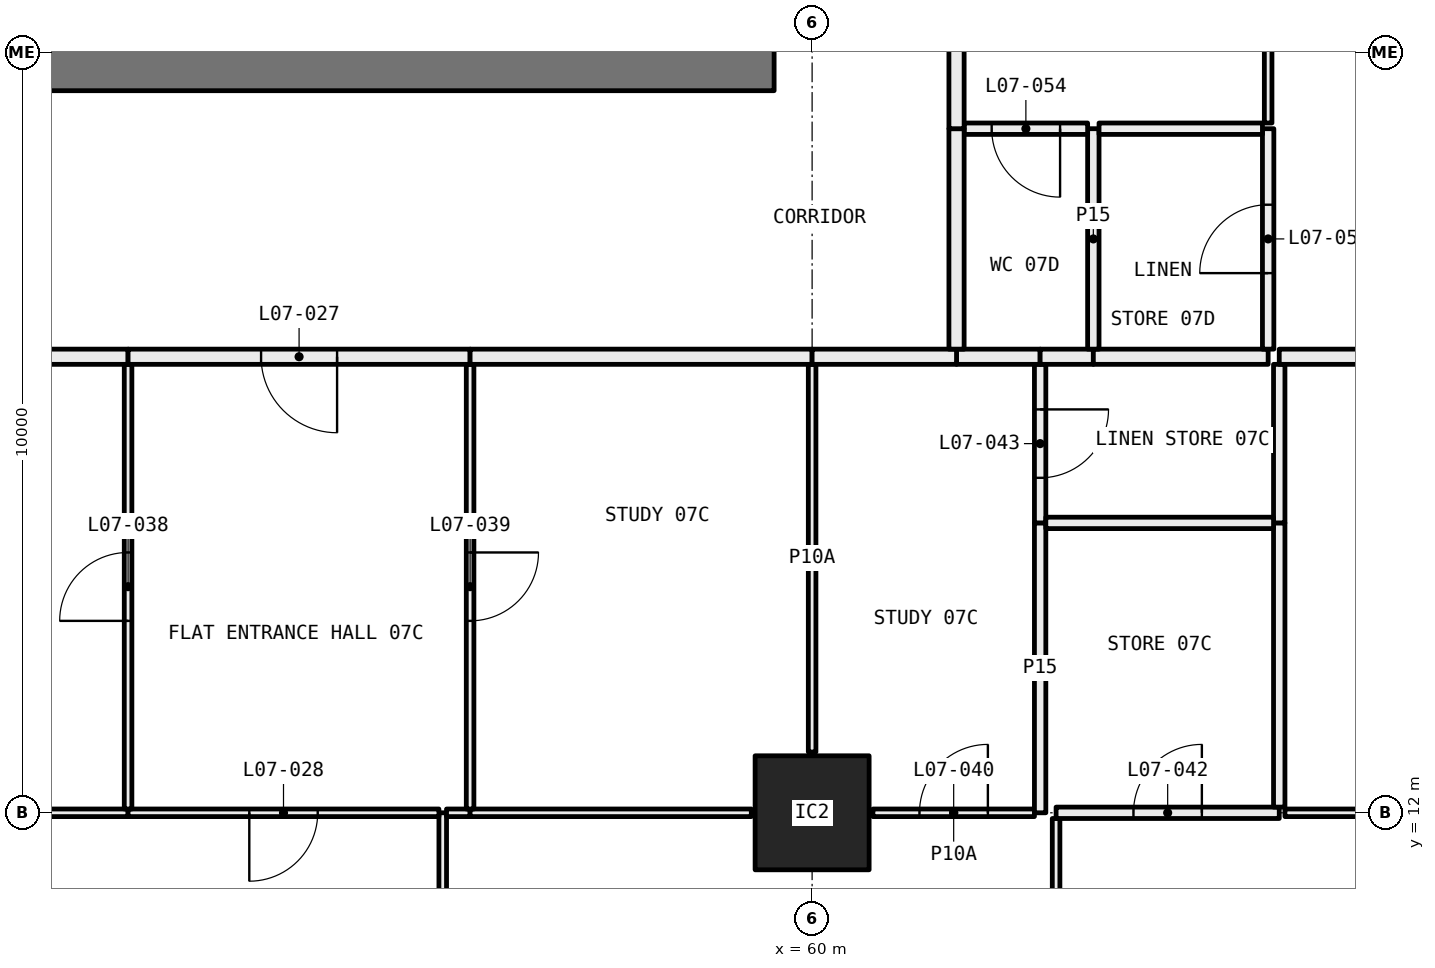
"""IFC4 building model, lengths in metres.
Left out: names, types, materials, properties, quantities, classifications, styles, units other than length and angle.
Written with IfcOpenShell. Run it as: python <this file> out.ifc"""

import sys

from ifc_helpers import new_model, si_unit, direction, frame, frame_2d, origin, origin_2d, place, context, subcontext, project, spatial, rectangle, hollow_rectangle, extrude, element, fill, save


model = new_model("IFC4")
c1 = context("Model", 3, precision=1e-05, world=origin(), true_north=direction((0.0, 1.0)))
c2 = subcontext(c1, "Body", "Model", "MODEL_VIEW")
j1 = project(units=[si_unit("LENGTHUNIT", "METRE"), si_unit("PLANEANGLEUNIT", "RADIAN")], contexts=[c1])
p1 = place(None, origin())
s1 = spatial("IfcSite", under=j1, at=p1, CompositionType="ELEMENT")
p2 = place(p1, origin())
s2 = spatial("IfcBuilding", under=s1, at=p2, CompositionType="ELEMENT")
p3 = place(p2, frame((0.0, 0.0, 36.9)))
s3 = spatial("IfcBuildingStorey", under=s2, at=p3, CompositionType="ELEMENT", Elevation=36.9)
p4 = place(p3, frame((60.0, 12.0, 0.0), z_axis=(0.0, 0.0, 1.0), x_axis=(1.0, 0.0, 0.0)))
e1 = element("IfcColumn", 1, at=p4, inside=s3, PredefinedType="COLUMN", context=c2, shape_type="SweptSolid", body=[
    extrude(hollow_rectangle(XDim=1.5, YDim=1.5, WallThickness=0.065, at=origin_2d()), origin(), (0.0, 0.0, 1.0), 3.05),
])
p5 = place(p3, frame((55.14, 6.05, 0.0), z_axis=(0.0, 0.0, 1.0), x_axis=(0.0, 1.0, 0.0)))
e2 = element("IfcWall", 2, at=p5, inside=s3, PredefinedType="PARTITIONING", context=c2, shape_type="SweptSolid", body=[
    extrude(rectangle(XDim=5.95, YDim=0.1, at=frame_2d((2.975, 0.0))), origin(), (0.0, 0.0, 1.0), 2.45),
])
p6 = place(p5, frame((2.525, 0.0, 0.0)))
e3 = element("IfcOpeningElement", 3, at=p6, cuts=e2, PredefinedType="OPENING", context=c2, shape_type="SweptSolid", body=[
    extrude(rectangle(XDim=0.9, YDim=2.1, at=frame_2d((0.45, 1.05))), frame((0.0, 0.06, 0.0), z_axis=(0.0, -1.0, 0.0), x_axis=(1.0, 0.0, 0.0)), (0.0, 0.0, 1.0), 0.12),
])
p7 = place(p3, frame((51.0, 12.0, 0.0), z_axis=(0.0, 0.0, 1.0), x_axis=(-1.0, 0.0, 0.0)))
e4 = element("IfcWall", 4, at=p7, inside=s3, PredefinedType="PARTITIONING", context=c2, shape_type="SweptSolid", body=[
    extrude(rectangle(XDim=2.2, YDim=0.1, at=frame_2d((1.1, 0.0))), origin(), (0.0, 0.0, 1.0), 2.45),
])
p8 = place(p3, frame((55.09, 12.0, 0.0), z_axis=(0.0, 0.0, 1.0), x_axis=(-1.0, 0.0, 0.0)))
e5 = element("IfcWall", 5, at=p8, inside=s3, PredefinedType="PARTITIONING", context=c2, shape_type="SweptSolid", body=[
    extrude(rectangle(XDim=4.09, YDim=0.1, at=frame_2d((2.045, 0.0))), origin(), (0.0, 0.0, 1.0), 2.45),
])
p9 = place(p8, frame((1.595, 0.0, 0.0)))
e6 = element("IfcOpeningElement", 6, at=p9, cuts=e5, PredefinedType="OPENING", context=c2, shape_type="SweptSolid", body=[
    extrude(rectangle(XDim=0.9, YDim=2.1, at=frame_2d((0.45, 1.05))), frame((0.0, 0.06, 0.0), z_axis=(0.0, -1.0, 0.0), x_axis=(1.0, 0.0, 0.0)), (0.0, 0.0, 1.0), 0.12),
])
p10 = place(p3, frame((63.21, 6.05, 0.0), z_axis=(0.0, 0.0, 1.0), x_axis=(0.0, 1.0, 0.0)))
e7 = element("IfcWall", 7, at=p10, inside=s3, PredefinedType="PARTITIONING", context=c2, shape_type="SweptSolid", body=[
    extrude(rectangle(XDim=5.875, YDim=0.1, at=frame_2d((2.938, 0.0))), origin(), (0.0, 0.0, 1.0), 2.45),
])
p11 = place(p10, frame((2.488, 0.0, 0.0)))
e8 = element("IfcOpeningElement", 8, at=p11, cuts=e7, PredefinedType="OPENING", context=c2, shape_type="SweptSolid", body=[
    extrude(rectangle(XDim=0.9, YDim=2.1, at=frame_2d((0.45, 1.05))), frame((0.0, 0.06, 0.0), z_axis=(0.0, -1.0, 0.0), x_axis=(1.0, 0.0, 0.0)), (0.0, 0.0, 1.0), 0.12),
])
p12 = place(p3, frame((55.5, 12.0, 0.0), z_axis=(0.0, 0.0, 1.0), x_axis=(-1.0, 0.0, 0.0)))
e9 = element("IfcWall", 9, at=p12, inside=s3, PredefinedType="PARTITIONING", context=c2, shape_type="SweptSolid", body=[
    extrude(rectangle(XDim=0.31, YDim=0.1, at=frame_2d((0.155, 0.0))), origin(), (0.0, 0.0, 1.0), 2.45),
])
p13 = place(p3, frame((59.2, 12.0, 0.0), z_axis=(0.0, 0.0, 1.0), x_axis=(-1.0, 0.0, 0.0)))
e10 = element("IfcWall", 10, at=p13, inside=s3, PredefinedType="PARTITIONING", context=c2, shape_type="SweptSolid", body=[
    extrude(rectangle(XDim=3.7, YDim=0.1, at=frame_2d((1.85, 0.0))), origin(), (0.0, 0.0, 1.0), 2.45),
])
p14 = place(p3, frame((62.925, 12.0, 0.0), z_axis=(0.0, 0.0, 1.0), x_axis=(-1.0, 0.0, 0.0)))
e11 = element("IfcWall", 11, at=p14, inside=s3, PredefinedType="PARTITIONING", context=c2, shape_type="SweptSolid", body=[
    extrude(rectangle(XDim=2.125, YDim=0.1, at=frame_2d((1.062, 0.0))), origin(), (0.0, 0.0, 1.0), 2.45),
])
p15 = place(p14, frame((0.613, 0.0, 0.0)))
e12 = element("IfcOpeningElement", 12, at=p15, cuts=e11, PredefinedType="OPENING", context=c2, shape_type="SweptSolid", body=[
    extrude(rectangle(XDim=0.9, YDim=2.1, at=frame_2d((0.45, 1.05))), frame((0.0, 0.06, 0.0), z_axis=(0.0, -1.0, 0.0), x_axis=(1.0, 0.0, 0.0)), (0.0, 0.0, 1.0), 0.12),
])
p16 = place(p3, frame((71.28, 12.0, 0.0), z_axis=(0.0, 0.0, 1.0), x_axis=(-1.0, 0.0, 0.0)))
e13 = element("IfcWall", 13, at=p16, inside=s3, PredefinedType="PARTITIONING", context=c2, shape_type="SweptSolid", body=[
    extrude(rectangle(XDim=5.059, YDim=0.1, at=frame_2d((2.53, 0.0))), origin(), (0.0, 0.0, 1.0), 2.45),
])
p17 = place(p16, frame((2.08, 0.0, 0.0)))
e14 = element("IfcOpeningElement", 14, at=p17, cuts=e13, PredefinedType="OPENING", context=c2, shape_type="SweptSolid", body=[
    extrude(rectangle(XDim=0.9, YDim=2.1, at=frame_2d((0.45, 1.05))), frame((0.0, 0.06, 0.0), z_axis=(0.0, -1.0, 0.0), x_axis=(1.0, 0.0, 0.0)), (0.0, 0.0, 1.0), 0.12),
])
p18 = place(p3, frame((66.146, 12.0, 0.0), z_axis=(0.0, 0.0, 1.0), x_axis=(-1.0, 0.0, 0.0)))
e15 = element("IfcWall", 15, at=p18, inside=s3, PredefinedType="PARTITIONING", context=c2, shape_type="SweptSolid", body=[
    extrude(rectangle(XDim=2.936, YDim=0.15, at=frame_2d((1.468, 0.0))), origin(), (0.0, 0.0, 1.0), 2.45),
])
p19 = place(p18, frame((1.018, 0.0, 0.0)))
e16 = element("IfcOpeningElement", 16, at=p19, cuts=e15, PredefinedType="OPENING", context=c2, shape_type="SweptSolid", body=[
    extrude(rectangle(XDim=0.9, YDim=2.1, at=frame_2d((0.45, 1.05))), frame((0.0, 0.085, 0.0), z_axis=(0.0, -1.0, 0.0), x_axis=(1.0, 0.0, 0.0)), (0.0, 0.0, 1.0), 0.17),
])
p20 = place(p3, frame((51.0, 12.05, 0.0), z_axis=(0.0, 0.0, 1.0), x_axis=(0.0, 1.0, 0.0)))
e17 = element("IfcWall", 17, at=p20, inside=s3, PredefinedType="PARTITIONING", context=c2, shape_type="SweptSolid", body=[
    extrude(rectangle(XDim=5.85, YDim=0.1, at=frame_2d((2.925, 0.0))), origin(), (0.0, 0.0, 1.0), 2.45),
])
p21 = place(p20, frame((2.475, 0.0, 0.0)))
e18 = element("IfcOpeningElement", 18, at=p21, cuts=e17, PredefinedType="OPENING", context=c2, shape_type="SweptSolid", body=[
    extrude(rectangle(XDim=0.9, YDim=2.1, at=frame_2d((0.45, 1.05))), frame((0.0, 0.06, 0.0), z_axis=(0.0, -1.0, 0.0), x_axis=(1.0, 0.0, 0.0)), (0.0, 0.0, 1.0), 0.12),
])
p22 = place(p3, frame((51.0, 18.0, 0.0), z_axis=(0.0, 0.0, 1.0), x_axis=(-1.0, 0.0, 0.0)))
e19 = element("IfcWall", 19, at=p22, inside=s3, PredefinedType="PARTITIONING", context=c2, shape_type="SweptSolid", body=[
    extrude(rectangle(XDim=4.9, YDim=0.2, at=frame_2d((2.45, 0.0))), origin(), (0.0, 0.0, 1.0), 3.05),
])
p23 = place(p3, frame((55.5, 12.05, 0.0), z_axis=(0.0, 0.0, 1.0), x_axis=(0.0, 1.0, 0.0)))
e20 = element("IfcWall", 20, at=p23, inside=s3, PredefinedType="PARTITIONING", context=c2, shape_type="SweptSolid", body=[
    extrude(rectangle(XDim=5.85, YDim=0.1, at=frame_2d((2.925, 0.0))), origin(), (0.0, 0.0, 1.0), 2.45),
])
p24 = place(p23, frame((2.475, 0.0, 0.0)))
e21 = element("IfcOpeningElement", 21, at=p24, cuts=e20, PredefinedType="OPENING", context=c2, shape_type="SweptSolid", body=[
    extrude(rectangle(XDim=0.9, YDim=2.1, at=frame_2d((0.45, 1.05))), frame((0.0, 0.06, 0.0), z_axis=(0.0, -1.0, 0.0), x_axis=(1.0, 0.0, 0.0)), (0.0, 0.0, 1.0), 0.12),
])
p25 = place(p3, frame((55.5, 18.0, 0.0), z_axis=(0.0, 0.0, 1.0), x_axis=(-1.0, 0.0, 0.0)))
e22 = element("IfcWall", 22, at=p25, inside=s3, PredefinedType="PARTITIONING", context=c2, shape_type="SweptSolid", body=[
    extrude(rectangle(XDim=4.5, YDim=0.2, at=frame_2d((2.25, 0.0))), origin(), (0.0, 0.0, 1.0), 3.05),
])
p26 = place(p25, frame((1.75, 0.0, 0.0)))
e23 = element("IfcOpeningElement", 23, at=p26, cuts=e22, PredefinedType="OPENING", context=c2, shape_type="SweptSolid", body=[
    extrude(rectangle(XDim=1.0, YDim=2.1, at=frame_2d((0.5, 1.05))), frame((0.0, 0.11, 0.0), z_axis=(0.0, -1.0, 0.0), x_axis=(1.0, 0.0, 0.0)), (0.0, 0.0, 1.0), 0.22),
])
p27 = place(p3, frame((60.0, 12.8, 0.0), z_axis=(0.0, 0.0, 1.0), x_axis=(0.0, 1.0, 0.0)))
e24 = element("IfcWall", 24, at=p27, inside=s3, PredefinedType="PARTITIONING", context=c2, shape_type="SweptSolid", body=[
    extrude(rectangle(XDim=5.1, YDim=0.1, at=frame_2d((2.55, 0.0))), origin(), (0.0, 0.0, 1.0), 3.05),
])
p28 = place(p3, frame((60.0, 18.0, 0.0), z_axis=(0.0, 0.0, 1.0), x_axis=(-1.0, 0.0, 0.0)))
e25 = element("IfcWall", 25, at=p28, inside=s3, PredefinedType="PARTITIONING", context=c2, shape_type="SweptSolid", body=[
    extrude(rectangle(XDim=4.5, YDim=0.2, at=frame_2d((2.25, 0.0))), origin(), (0.0, 0.0, 1.0), 3.05),
])
p29 = place(p3, frame((63.0, 12.0, 0.0), z_axis=(0.0, 0.0, 1.0), x_axis=(0.0, 1.0, 0.0)))
e26 = element("IfcWall", 26, at=p29, inside=s3, PredefinedType="PARTITIONING", context=c2, shape_type="SweptSolid", body=[
    extrude(rectangle(XDim=3.814, YDim=0.15, at=frame_2d((1.907, 0.0))), origin(), (0.0, 0.0, 1.0), 2.45),
])
p30 = place(p3, frame((63.0, 15.814, 0.0), z_axis=(0.0, 0.0, 1.0), x_axis=(0.0, 1.0, 0.0)))
e27 = element("IfcWall", 27, at=p30, inside=s3, PredefinedType="PARTITIONING", context=c2, shape_type="SweptSolid", body=[
    extrude(rectangle(XDim=2.086, YDim=0.15, at=frame_2d((1.043, 0.0))), origin(), (0.0, 0.0, 1.0), 3.05),
])
p31 = place(p30, frame((0.593, 0.0, 0.0)))
e28 = element("IfcOpeningElement", 28, at=p31, cuts=e27, PredefinedType="OPENING", context=c2, shape_type="SweptSolid", body=[
    extrude(rectangle(XDim=0.9, YDim=2.1, at=frame_2d((0.45, 1.05))), frame((0.0, 0.085, 0.0), z_axis=(0.0, -1.0, 0.0), x_axis=(1.0, 0.0, 0.0)), (0.0, 0.0, 1.0), 0.17),
])
p32 = place(p3, frame((63.0, 18.0, 0.0), z_axis=(0.0, 0.0, 1.0), x_axis=(-1.0, 0.0, 0.0)))
e29 = element("IfcWall", 29, at=p32, inside=s3, PredefinedType="PARTITIONING", context=c2, shape_type="SweptSolid", body=[
    extrude(rectangle(XDim=1.1, YDim=0.2, at=frame_2d((0.55, 0.0))), origin(), (0.0, 0.0, 1.0), 3.05),
])
p33 = place(p3, frame((61.9, 18.0, 0.0), z_axis=(0.0, 0.0, 1.0), x_axis=(-1.0, 0.0, 0.0)))
e30 = element("IfcWall", 30, at=p33, inside=s3, PredefinedType="PARTITIONING", context=c2, shape_type="SweptSolid", body=[
    extrude(rectangle(XDim=1.9, YDim=0.2, at=frame_2d((0.95, 0.0))), origin(), (0.0, 0.0, 1.0), 3.05),
])
p34 = place(p3, frame((66.146, 15.814, 0.0), z_axis=(0.0, 0.0, 1.0), x_axis=(0.0, -1.0, 0.0)))
e31 = element("IfcWall", 31, at=p34, inside=s3, PredefinedType="PARTITIONING", context=c2, shape_type="SweptSolid", body=[
    extrude(rectangle(XDim=3.739, YDim=0.15, at=frame_2d((1.87, 0.0))), origin(), (0.0, 0.0, 1.0), 2.45),
])
p35 = place(p3, frame((66.146, 17.9, 0.0), z_axis=(0.0, 0.0, 1.0), x_axis=(0.0, -1.0, 0.0)))
e32 = element("IfcWall", 32, at=p35, inside=s3, PredefinedType="PARTITIONING", context=c2, shape_type="SweptSolid", body=[
    extrude(rectangle(XDim=2.086, YDim=0.15, at=frame_2d((1.043, 0.0))), origin(), (0.0, 0.0, 1.0), 2.55),
])
p36 = place(p3, frame((71.28, 18.0, 0.0), z_axis=(0.0, 0.0, 1.0), x_axis=(-1.0, 0.0, 0.0)))
e33 = element("IfcWall", 33, at=p36, inside=s3, PredefinedType="PARTITIONING", context=c2, shape_type="SweptSolid", body=[
    extrude(rectangle(XDim=5.134, YDim=0.2, at=frame_2d((2.567, 0.0))), origin(), (0.0, 0.0, 1.0), 3.05),
])
p37 = place(p3, frame((66.071, 15.814, 0.0), z_axis=(0.0, 0.0, 1.0), x_axis=(-1.0, 0.0, 0.0)))
e34 = element("IfcWall", 34, at=p37, inside=s3, PredefinedType="PARTITIONING", context=c2, shape_type="SweptSolid", body=[
    extrude(rectangle(XDim=2.996, YDim=0.15, at=frame_2d((1.498, 0.0))), origin(), (0.0, 0.0, 1.0), 3.05),
])
p38 = place(p3, frame((63.7, 18.0, 0.0), z_axis=(0.0, 0.0, 1.0), x_axis=(-1.0, 0.0, 0.0)))
e35 = element("IfcWall", 35, at=p38, inside=s3, PredefinedType="PARTITIONING", context=c2, shape_type="SweptSolid", body=[
    extrude(rectangle(XDim=0.7, YDim=0.2, at=frame_2d((0.35, 0.0))), origin(), (0.0, 0.0, 1.0), 3.05),
])
p39 = place(p3, frame((66.0, 18.0, 0.0), z_axis=(0.0, 0.0, 1.0), x_axis=(-1.0, 0.0, 0.0)))
e36 = element("IfcWall", 36, at=p39, inside=s3, PredefinedType="PARTITIONING", context=c2, shape_type="SweptSolid", body=[
    extrude(rectangle(XDim=2.3, YDim=0.2, at=frame_2d((1.15, 0.0))), origin(), (0.0, 0.0, 1.0), 3.05),
])
p40 = place(p3, frame((66.0, 21.0, 0.0), z_axis=(0.0, 0.0, 1.0), x_axis=(0.0, -1.0, 0.0)))
e37 = element("IfcWall", 37, at=p40, inside=s3, PredefinedType="PARTITIONING", context=c2, shape_type="SweptSolid", body=[
    extrude(rectangle(XDim=2.9, YDim=0.15, at=frame_2d((1.45, 0.0))), origin(), (0.0, 0.0, 1.0), 3.05),
])
p41 = place(p40, frame((1.0, 0.0, 0.0)))
e38 = element("IfcOpeningElement", 38, at=p41, cuts=e37, PredefinedType="OPENING", context=c2, shape_type="SweptSolid", body=[
    extrude(rectangle(XDim=0.9, YDim=2.1, at=frame_2d((0.45, 1.05))), frame((0.0, 0.085, 0.0), z_axis=(0.0, -1.0, 0.0), x_axis=(1.0, 0.0, 0.0)), (0.0, 0.0, 1.0), 0.17),
])
p42 = place(p3, frame((66.0, 23.95, 0.0), z_axis=(0.0, 0.0, 1.0), x_axis=(0.0, -1.0, 0.0)))
e39 = element("IfcWall", 39, at=p42, inside=s3, PredefinedType="PARTITIONING", context=c2, shape_type="SweptSolid", body=[
    extrude(rectangle(XDim=2.875, YDim=0.1, at=frame_2d((1.438, 0.0))), origin(), (0.0, 0.0, 1.0), 2.45),
])
p43 = place(p3, frame((63.7, 18.1, 0.0), z_axis=(0.0, 0.0, 1.0), x_axis=(0.0, 1.0, 0.0)))
e40 = element("IfcWall", 40, at=p43, inside=s3, PredefinedType="PARTITIONING", context=c2, shape_type="SweptSolid", body=[
    extrude(rectangle(XDim=2.9, YDim=0.15, at=frame_2d((1.45, 0.0))), origin(), (0.0, 0.0, 1.0), 3.05),
])
p44 = place(p3, frame((63.625, 21.0, 0.0), z_axis=(0.0, 0.0, 1.0), x_axis=(-1.0, 0.0, 0.0)))
e41 = element("IfcWall", 41, at=p44, inside=s3, PredefinedType="PARTITIONING", context=c2, shape_type="SweptSolid", body=[
    extrude(rectangle(XDim=1.625, YDim=0.15, at=frame_2d((0.812, 0.0))), origin(), (0.0, 0.0, 1.0), 3.05),
])
p45 = place(p44, frame((0.363, 0.0, 0.0)))
e42 = element("IfcOpeningElement", 42, at=p45, cuts=e41, PredefinedType="OPENING", context=c2, shape_type="SweptSolid", body=[
    extrude(rectangle(XDim=0.9, YDim=2.1, at=frame_2d((0.45, 1.05))), frame((0.0, 0.085, 0.0), z_axis=(0.0, -1.0, 0.0), x_axis=(1.0, 0.0, 0.0)), (0.0, 0.0, 1.0), 0.17),
])
p46 = place(p3, frame((61.9, 21.0, 0.0), z_axis=(0.0, 0.0, 1.0), x_axis=(0.0, -1.0, 0.0)))
e43 = element("IfcWall", 43, at=p46, inside=s3, PredefinedType="PARTITIONING", context=c2, shape_type="SweptSolid", body=[
    extrude(rectangle(XDim=2.9, YDim=0.2, at=frame_2d((1.45, 0.0))), origin(), (0.0, 0.0, 1.0), 3.05),
])
p47 = place(p3, frame((65.925, 21.0, 0.0), z_axis=(0.0, 0.0, 1.0), x_axis=(-1.0, 0.0, 0.0)))
e44 = element("IfcWall", 44, at=p47, inside=s3, PredefinedType="PARTITIONING", context=c2, shape_type="SweptSolid", body=[
    extrude(rectangle(XDim=2.15, YDim=0.15, at=frame_2d((1.075, 0.0))), origin(), (0.0, 0.0, 1.0), 3.05),
])
p48 = place(p3, frame((61.9, 23.9, 0.0), z_axis=(0.0, 0.0, 1.0), x_axis=(0.0, -1.0, 0.0)))
e45 = element("IfcWall", 45, at=p48, inside=s3, PredefinedType="PARTITIONING", context=c2, shape_type="SweptSolid", body=[
    extrude(rectangle(XDim=2.9, YDim=0.2, at=frame_2d((1.45, 0.0))), origin(), (0.0, 0.0, 1.0), 3.05),
])
p49 = place(p3, frame((59.5, 21.9, 0.0), z_axis=(0.0, 0.0, 1.0), x_axis=(-1.0, 0.0, 0.0)))
e46 = element("IfcWall", 46, at=p49, inside=s3, PredefinedType="SHEAR", context=c2, shape_type="SweptSolid", body=[
    extrude(rectangle(XDim=11.0, YDim=0.8, at=frame_2d((5.5, 0.0))), origin(), (0.0, 0.0, 1.0), 3.05),
])
p50 = place(p26, origin())
e47 = element("IfcDoor", 47, at=p50, inside=s3, OperationType="SINGLE_SWING_RIGHT", PredefinedType="DOOR", context=c2, shape_type="SweptSolid", body=[
    extrude(rectangle(XDim=1.0, YDim=2.1, at=frame_2d((0.5, 1.05))), frame((0.0, 0.025, 0.0), z_axis=(0.0, -1.0, 0.0), x_axis=(1.0, 0.0, 0.0)), (0.0, 0.0, 1.0), 0.05),
])
fill(e23, e47)
p51 = place(p9, origin())
e48 = element("IfcDoor", 48, at=p51, inside=s3, OperationType="SINGLE_SWING_LEFT", PredefinedType="DOOR", context=c2, shape_type="SweptSolid", body=[
    extrude(rectangle(XDim=0.9, YDim=2.1, at=frame_2d((0.45, 1.05))), frame((0.0, 0.025, 0.0), z_axis=(0.0, -1.0, 0.0), x_axis=(1.0, 0.0, 0.0)), (0.0, 0.0, 1.0), 0.05),
])
fill(e6, e48)
p52 = place(p21, origin())
e49 = element("IfcDoor", 49, at=p52, inside=s3, OperationType="SINGLE_SWING_RIGHT", PredefinedType="DOOR", context=c2, shape_type="SweptSolid", body=[
    extrude(rectangle(XDim=0.9, YDim=2.1, at=frame_2d((0.45, 1.05))), frame((0.0, 0.025, 0.0), z_axis=(0.0, -1.0, 0.0), x_axis=(1.0, 0.0, 0.0)), (0.0, 0.0, 1.0), 0.05),
])
fill(e18, e49)
p53 = place(p24, frame((0.9, 0.0, 0.0), x_axis=(-1.0, 0.0, 0.0)))
e50 = element("IfcDoor", 50, at=p53, inside=s3, OperationType="SINGLE_SWING_RIGHT", PredefinedType="DOOR", context=c2, shape_type="SweptSolid", body=[
    extrude(rectangle(XDim=0.9, YDim=2.1, at=frame_2d((0.45, 1.05))), frame((0.0, 0.025, 0.0), z_axis=(0.0, -1.0, 0.0), x_axis=(1.0, 0.0, 0.0)), (0.0, 0.0, 1.0), 0.05),
])
fill(e21, e50)
p54 = place(p15, frame((0.9, 0.0, 0.0), x_axis=(-1.0, 0.0, 0.0)))
e51 = element("IfcDoor", 51, at=p54, inside=s3, OperationType="SINGLE_SWING_LEFT", PredefinedType="DOOR", context=c2, shape_type="SweptSolid", body=[
    extrude(rectangle(XDim=0.9, YDim=2.1, at=frame_2d((0.45, 1.05))), frame((0.0, 0.025, 0.0), z_axis=(0.0, -1.0, 0.0), x_axis=(1.0, 0.0, 0.0)), (0.0, 0.0, 1.0), 0.05),
])
fill(e12, e51)
p55 = place(p19, frame((0.9, 0.0, 0.0), x_axis=(-1.0, 0.0, 0.0)))
e52 = element("IfcDoor", 52, at=p55, inside=s3, OperationType="SINGLE_SWING_LEFT", PredefinedType="DOOR", context=c2, shape_type="SweptSolid", body=[
    extrude(rectangle(XDim=0.9, YDim=2.1, at=frame_2d((0.45, 1.05))), frame((0.0, 0.025, 0.0), z_axis=(0.0, -1.0, 0.0), x_axis=(1.0, 0.0, 0.0)), (0.0, 0.0, 1.0), 0.05),
])
fill(e16, e52)
p56 = place(p31, frame((0.9, 0.0, 0.0), x_axis=(-1.0, 0.0, 0.0)))
e53 = element("IfcDoor", 53, at=p56, inside=s3, OperationType="SINGLE_SWING_RIGHT", PredefinedType="DOOR", context=c2, shape_type="SweptSolid", body=[
    extrude(rectangle(XDim=0.9, YDim=2.1, at=frame_2d((0.45, 1.05))), frame((0.0, 0.025, 0.0), z_axis=(0.0, -1.0, 0.0), x_axis=(1.0, 0.0, 0.0)), (0.0, 0.0, 1.0), 0.05),
])
fill(e28, e53)
p57 = place(p45, origin())
e54 = element("IfcDoor", 54, at=p57, inside=s3, OperationType="SINGLE_SWING_RIGHT", PredefinedType="DOOR", context=c2, shape_type="SweptSolid", body=[
    extrude(rectangle(XDim=0.9, YDim=2.1, at=frame_2d((0.45, 1.05))), frame((0.0, 0.025, 0.0), z_axis=(0.0, -1.0, 0.0), x_axis=(1.0, 0.0, 0.0)), (0.0, 0.0, 1.0), 0.05),
])
fill(e42, e54)
p58 = place(p41, frame((0.9, 0.0, 0.0), x_axis=(-1.0, 0.0, 0.0)))
e55 = element("IfcDoor", 55, at=p58, inside=s3, OperationType="SINGLE_SWING_RIGHT", PredefinedType="DOOR", context=c2, shape_type="SweptSolid", body=[
    extrude(rectangle(XDim=0.9, YDim=2.1, at=frame_2d((0.45, 1.05))), frame((0.0, 0.025, 0.0), z_axis=(0.0, -1.0, 0.0), x_axis=(1.0, 0.0, 0.0)), (0.0, 0.0, 1.0), 0.05),
])
fill(e38, e55)
save(model, sys.argv[1])
